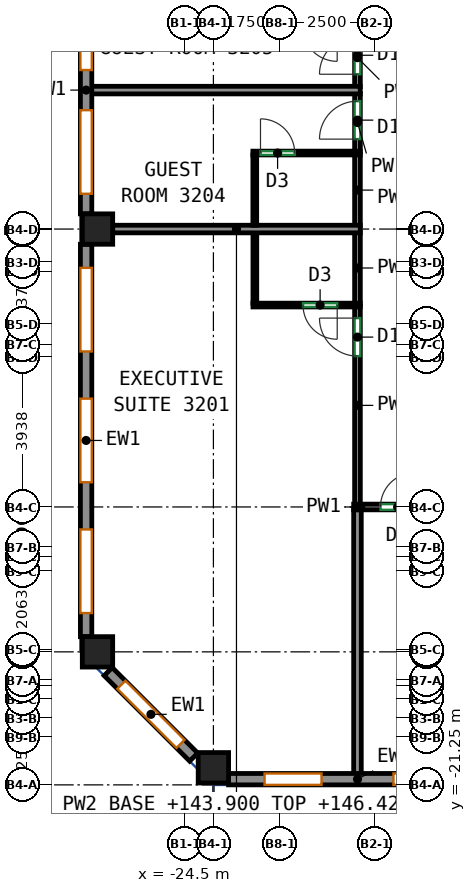
"""IFC4 building model, lengths in metres.
Left out: names, types, materials, properties, quantities, classifications, styles, units other than length and angle.
Written with IfcOpenShell. Run it as: python <this file> out.ifc"""

import sys

from ifc_helpers import new_model, si_unit, direction, frame, frame_2d, origin, origin_2d, place, context, subcontext, project, spatial, rectangle, extrude, source, transform, mapped, element, fill, save


model = new_model("IFC4")
c1 = context("Model", 3, precision=1e-05, world=origin(), true_north=direction((0.0, 1.0)))
c2 = subcontext(c1, "Body", "Model", "MODEL_VIEW")
j1 = project(units=[si_unit("LENGTHUNIT", "METRE"), si_unit("PLANEANGLEUNIT", "RADIAN")], contexts=[c1])
p1 = place(None, origin())
s1 = spatial("IfcSite", under=j1, at=p1, CompositionType="ELEMENT")
p2 = place(p1, origin())
s2 = spatial("IfcBuilding", under=s1, at=p2, CompositionType="ELEMENT")
p3 = place(p2, frame((0.0, 0.0, 143.9)))
s3 = spatial("IfcBuildingStorey", under=s2, at=p3, CompositionType="ELEMENT", Elevation=143.9)
m1 = source(origin(), c2, "Body", "SweptSolid", [
    extrude(rectangle(XDim=0.8, YDim=0.8, at=origin_2d()), origin(), (0.0, 0.0, 1.0), 3.12),
])
for number, where, z_axis, x_axis in (
    (1, (-26.8, -17.75, 0.0), (0.0, 0.0, 1.0), (1.0, 0.0, 0.0)),
    (2, (-26.8, -6.625, 0.0), (0.0, 0.0, 1.0), (1.0, 0.0, 0.0)),
    (3, (-23.75, -20.8, 0.0), (0.0, 0.0, 1.0), (1.0, 0.0, 0.0)),
):
    element("IfcColumn", number, at=place(p3, frame(where, z_axis=z_axis, x_axis=x_axis)), inside=s3, PredefinedType="COLUMN", context=c2, shape_type="MappedRepresentation", body=[
        mapped(m1, transform((0.0, 0.0, 0.0))),
    ])
m2 = source(origin(), c2, "Body", "SweptSolid", [
    extrude(rectangle(XDim=6.783, YDim=0.3, at=frame_2d((3.392, 0.0))), origin(), (0.0, 0.0, 1.0), 3.12),
])
p4 = place(p3, frame((-23.35, -21.1, 0.0), z_axis=(0.0, 0.0, 1.0), x_axis=(1.0, 0.0, 0.0)))
e4 = element("IfcWall", 4, at=p4, inside=s3, PredefinedType="SOLIDWALL", context=c2, shape_type="MappedRepresentation", body=[
    mapped(m2, transform((0.0, 0.0, 0.0))),
])
p5 = place(p4, frame((0.946, 0.0, 0.85)))
e5 = element("IfcOpeningElement", 5, at=p5, cuts=e4, PredefinedType="OPENING", context=c2, shape_type="SweptSolid", body=[
    extrude(rectangle(XDim=1.5, YDim=1.95, at=frame_2d((0.75, 0.975))), frame((0.0, 0.16, 0.0), z_axis=(0.0, -1.0, 0.0), x_axis=(1.0, 0.0, 0.0)), (0.0, 0.0, 1.0), 0.32),
])
p6 = place(p4, frame((4.337, 0.0, 0.85)))
e6 = element("IfcOpeningElement", 6, at=p6, cuts=e4, PredefinedType="OPENING", context=c2, shape_type="SweptSolid", body=[
    extrude(rectangle(XDim=1.5, YDim=1.95, at=frame_2d((0.75, 0.975))), frame((0.0, 0.16, 0.0), z_axis=(0.0, -1.0, 0.0), x_axis=(1.0, 0.0, 0.0)), (0.0, 0.0, 1.0), 0.32),
])
m3 = source(origin(), c2, "Body", "SweptSolid", [
    extrude(rectangle(XDim=6.513, YDim=0.3, at=frame_2d((3.256, 0.0))), origin(), (0.0, 0.0, 1.0), 3.12),
])
p7 = place(p3, frame((-27.1, 0.288, 0.0), z_axis=(0.0, 0.0, 1.0), x_axis=(0.0, -1.0, 0.0)))
e7 = element("IfcWall", 7, at=p7, inside=s3, PredefinedType="SOLIDWALL", context=c2, shape_type="MappedRepresentation", body=[
    mapped(m3, transform((0.0, 0.0, 0.0))),
])
p8 = place(p7, frame((0.528, 0.0, 0.85)))
e8 = element("IfcOpeningElement", 8, at=p8, cuts=e7, PredefinedType="OPENING", context=c2, shape_type="SweptSolid", body=[
    extrude(rectangle(XDim=2.2, YDim=1.95, at=frame_2d((1.1, 0.975))), frame((0.0, 0.16, 0.0), z_axis=(0.0, -1.0, 0.0), x_axis=(1.0, 0.0, 0.0)), (0.0, 0.0, 1.0), 0.32),
])
p9 = place(p7, frame((3.784, 0.0, 0.85)))
e9 = element("IfcOpeningElement", 9, at=p9, cuts=e7, PredefinedType="OPENING", context=c2, shape_type="SweptSolid", body=[
    extrude(rectangle(XDim=2.2, YDim=1.95, at=frame_2d((1.1, 0.975))), frame((0.0, 0.16, 0.0), z_axis=(0.0, -1.0, 0.0), x_axis=(1.0, 0.0, 0.0)), (0.0, 0.0, 1.0), 0.32),
])
m4 = source(origin(), c2, "Body", "SweptSolid", [
    extrude(rectangle(XDim=10.325, YDim=0.3, at=frame_2d((5.163, 0.0))), origin(), (0.0, 0.0, 1.0), 3.12),
])
p10 = place(p3, frame((-27.1, -7.025, 0.0), z_axis=(0.0, 0.0, 1.0), x_axis=(0.0, -1.0, 0.0)))
e10 = element("IfcWall", 10, at=p10, inside=s3, PredefinedType="SOLIDWALL", context=c2, shape_type="MappedRepresentation", body=[
    mapped(m4, transform((0.0, 0.0, 0.0))),
])
p11 = place(p10, frame((0.621, 0.0, 0.85)))
e11 = element("IfcOpeningElement", 11, at=p11, cuts=e10, PredefinedType="OPENING", context=c2, shape_type="SweptSolid", body=[
    extrude(rectangle(XDim=2.2, YDim=1.95, at=frame_2d((1.1, 0.975))), frame((0.0, 0.16, 0.0), z_axis=(0.0, -1.0, 0.0), x_axis=(1.0, 0.0, 0.0)), (0.0, 0.0, 1.0), 0.32),
])
p12 = place(p10, frame((4.062, 0.0, 0.85)))
e12 = element("IfcOpeningElement", 12, at=p12, cuts=e10, PredefinedType="OPENING", context=c2, shape_type="SweptSolid", body=[
    extrude(rectangle(XDim=2.2, YDim=1.95, at=frame_2d((1.1, 0.975))), frame((0.0, 0.16, 0.0), z_axis=(0.0, -1.0, 0.0), x_axis=(1.0, 0.0, 0.0)), (0.0, 0.0, 1.0), 0.32),
])
p13 = place(p10, frame((7.504, 0.0, 0.85)))
e13 = element("IfcOpeningElement", 13, at=p13, cuts=e10, PredefinedType="OPENING", context=c2, shape_type="SweptSolid", body=[
    extrude(rectangle(XDim=2.2, YDim=1.95, at=frame_2d((1.1, 0.975))), frame((0.0, 0.16, 0.0), z_axis=(0.0, -1.0, 0.0), x_axis=(1.0, 0.0, 0.0)), (0.0, 0.0, 1.0), 0.32),
])
m5 = source(origin(), c2, "Body", "SweptSolid", [
    extrude(rectangle(XDim=3.182, YDim=0.3, at=frame_2d((1.591, 0.0))), origin(), (0.0, 0.0, 1.0), 3.12),
])
p14 = place(p3, frame((-26.519, -18.269, 0.0), z_axis=(0.0, 0.0, 1.0), x_axis=(0.707068419229, -0.707145141063, 0.0)))
e14 = element("IfcWall", 14, at=p14, inside=s3, PredefinedType="SOLIDWALL", context=c2, shape_type="MappedRepresentation", body=[
    mapped(m5, transform((0.0, 0.0, 0.0))),
])
p15 = place(p14, frame((0.491, 0.0, 0.85)))
e15 = element("IfcOpeningElement", 15, at=p15, cuts=e14, PredefinedType="OPENING", context=c2, shape_type="SweptSolid", body=[
    extrude(rectangle(XDim=2.2, YDim=1.95, at=frame_2d((1.1, 0.975))), frame((0.0, 0.16, 0.0), z_axis=(0.0, -1.0, 0.0), x_axis=(1.0, 0.0, 0.0)), (0.0, 0.0, 1.0), 0.32),
])
p16 = place(p3, frame((-20.059, -13.938, 0.0), z_axis=(0.0, 0.0, 1.0), x_axis=(1.0, 0.0, 0.0)))
e16 = element("IfcWall", 16, at=p16, inside=s3, PredefinedType="PARTITIONING", context=c2, shape_type="SweptSolid", body=[
    extrude(rectangle(XDim=2.309, YDim=0.15, at=frame_2d((1.155, 0.0))), origin(), (0.0, 0.0, 1.0), 3.12),
])
p17 = place(p16, frame((0.705, 0.0, 0.0)))
e17 = element("IfcOpeningElement", 17, at=p17, cuts=e16, PredefinedType="OPENING", context=c2, shape_type="SweptSolid", body=[
    extrude(rectangle(XDim=0.9, YDim=2.1, at=frame_2d((0.45, 1.05))), frame((0.0, 0.085, 0.0), z_axis=(0.0, -1.0, 0.0), x_axis=(1.0, 0.0, 0.0)), (0.0, 0.0, 1.0), 0.17),
])
p18 = place(p3, frame((-19.959, -13.863, 0.0), z_axis=(0.0, 0.0, 1.0), x_axis=(0.0, 1.0, 0.0)))
e18 = element("IfcWall", 18, at=p18, inside=s3, PredefinedType="PARTITIONING", context=c2, shape_type="SweptSolid", body=[
    extrude(rectangle(XDim=5.198, YDim=0.15, at=frame_2d((2.599, 0.0))), origin(), (0.0, 0.0, 1.0), 3.12),
])
p19 = place(p18, frame((3.895, 0.0, 0.0)))
e19 = element("IfcOpeningElement", 19, at=p19, cuts=e18, PredefinedType="OPENING", context=c2, shape_type="SweptSolid", body=[
    extrude(rectangle(XDim=1.0, YDim=2.1, at=frame_2d((0.5, 1.05))), frame((0.0, 0.085, 0.0), z_axis=(0.0, -1.0, 0.0), x_axis=(1.0, 0.0, 0.0)), (0.0, 0.0, 1.0), 0.17),
])
p20 = place(p3, frame((-19.959, -8.585, 0.0), z_axis=(0.0, 0.0, 1.0), x_axis=(0.0, 1.0, 0.0)))
e20 = element("IfcWall", 20, at=p20, inside=s3, PredefinedType="PARTITIONING", context=c2, shape_type="SweptSolid", body=[
    extrude(rectangle(XDim=1.87, YDim=0.15, at=frame_2d((0.935, 0.0))), origin(), (0.0, 0.0, 1.0), 3.12),
])
p21 = place(p3, frame((-19.959, -4.585, 0.0), z_axis=(0.0, 0.0, 1.0), x_axis=(0.0, 1.0, 0.0)))
e21 = element("IfcWall", 21, at=p21, inside=s3, PredefinedType="PARTITIONING", context=c2, shape_type="SweptSolid", body=[
    extrude(rectangle(XDim=1.526, YDim=0.15, at=frame_2d((0.763, 0.0))), origin(), (0.0, 0.0, 1.0), 3.12),
])
p22 = place(p21, frame((0.326, 0.0, 0.0)))
e22 = element("IfcOpeningElement", 22, at=p22, cuts=e21, PredefinedType="OPENING", context=c2, shape_type="SweptSolid", body=[
    extrude(rectangle(XDim=1.0, YDim=2.1, at=frame_2d((0.5, 1.05))), frame((0.0, 0.085, 0.0), z_axis=(0.0, -1.0, 0.0), x_axis=(1.0, 0.0, 0.0)), (0.0, 0.0, 1.0), 0.17),
])
p23 = place(p3, frame((-19.959, -6.535, 0.0), z_axis=(0.0, 0.0, 1.0), x_axis=(0.0, 1.0, 0.0)))
e23 = element("IfcWall", 23, at=p23, inside=s3, PredefinedType="PARTITIONING", context=c2, shape_type="SweptSolid", body=[
    extrude(rectangle(XDim=1.87, YDim=0.15, at=frame_2d((0.935, 0.0))), origin(), (0.0, 0.0, 1.0), 3.12),
])
p24 = place(p3, frame((-19.959, -2.879, 0.0), z_axis=(0.0, 0.0, 1.0), x_axis=(0.0, 1.0, 0.0)))
e24 = element("IfcWall", 24, at=p24, inside=s3, PredefinedType="PARTITIONING", context=c2, shape_type="SweptSolid", body=[
    extrude(rectangle(XDim=1.527, YDim=0.15, at=frame_2d((0.763, 0.0))), origin(), (0.0, 0.0, 1.0), 3.12),
])
p25 = place(p24, frame((0.327, 0.0, 0.0)))
e25 = element("IfcOpeningElement", 25, at=p25, cuts=e24, PredefinedType="OPENING", context=c2, shape_type="SweptSolid", body=[
    extrude(rectangle(XDim=1.0, YDim=2.1, at=frame_2d((0.5, 1.05))), frame((0.0, 0.085, 0.0), z_axis=(0.0, -1.0, 0.0), x_axis=(1.0, 0.0, 0.0)), (0.0, 0.0, 1.0), 0.17),
])
p26 = place(p3, frame((-19.959, -21.0, 0.0), z_axis=(0.0, 0.0, 1.0), x_axis=(0.0, 1.0, 0.0)))
e26 = element("IfcWall", 26, at=p26, inside=s3, PredefinedType="PARTITIONING", context=c2, shape_type="SweptSolid", body=[
    extrude(rectangle(XDim=6.985, YDim=0.2, at=frame_2d((3.493, 0.0))), origin(), (0.0, 0.0, 1.0), 3.12),
])
p27 = place(p3, frame((-22.659, -8.575, 0.0), z_axis=(0.0, 0.0, 1.0), x_axis=(0.0, 1.0, 0.0)))
e27 = element("IfcWall", 27, at=p27, inside=s3, PredefinedType="PARTITIONING", context=c2, shape_type="SweptSolid", body=[
    extrude(rectangle(XDim=1.85, YDim=0.1, at=frame_2d((0.925, 0.0))), origin(), (0.0, 0.0, 1.0), 3.12),
])
p28 = place(p3, frame((-19.886, -8.625, 0.0), z_axis=(0.0, 0.0, 1.0), x_axis=(-1.0, 0.0, 0.0)))
e28 = element("IfcWall", 28, at=p28, inside=s3, PredefinedType="PARTITIONING", context=c2, shape_type="SweptSolid", body=[
    extrude(rectangle(XDim=2.823, YDim=0.1, at=frame_2d((1.412, 0.0))), origin(), (0.0, 0.0, 1.0), 3.12),
])
p29 = place(p28, frame((0.606, 0.0, 0.0)))
e29 = element("IfcOpeningElement", 29, at=p29, cuts=e28, PredefinedType="OPENING", context=c2, shape_type="SweptSolid", body=[
    extrude(rectangle(XDim=0.9, YDim=2.1, at=frame_2d((0.45, 1.05))), frame((0.0, 0.06, 0.0), z_axis=(0.0, -1.0, 0.0), x_axis=(1.0, 0.0, 0.0)), (0.0, 0.0, 1.0), 0.12),
])
p30 = place(p3, frame((-26.4, -6.625, 0.0), z_axis=(0.0, 0.0, 1.0), x_axis=(1.0, 0.0, 0.0)))
e30 = element("IfcWall", 30, at=p30, inside=s3, PredefinedType="PARTITIONING", context=c2, shape_type="SweptSolid", body=[
    extrude(rectangle(XDim=6.514, YDim=0.2, at=frame_2d((3.257, 0.0))), origin(), (0.0, 0.0, 1.0), 2.52),
])
p31 = place(p3, frame((-22.711, -4.625, 0.0), z_axis=(0.0, 0.0, 1.0), x_axis=(1.0, 0.0, 0.0)))
e31 = element("IfcWall", 31, at=p31, inside=s3, PredefinedType="PARTITIONING", context=c2, shape_type="SweptSolid", body=[
    extrude(rectangle(XDim=2.825, YDim=0.1, at=frame_2d((1.413, 0.0))), origin(), (0.0, 0.0, 1.0), 3.12),
])
p32 = place(p31, frame((0.2, 0.0, 0.0)))
e32 = element("IfcOpeningElement", 32, at=p32, cuts=e31, PredefinedType="OPENING", context=c2, shape_type="SweptSolid", body=[
    extrude(rectangle(XDim=0.9, YDim=2.1, at=frame_2d((0.45, 1.05))), frame((0.0, 0.06, 0.0), z_axis=(0.0, -1.0, 0.0), x_axis=(1.0, 0.0, 0.0)), (0.0, 0.0, 1.0), 0.12),
])
p33 = place(p3, frame((-22.661, -6.525, 0.0), z_axis=(0.0, 0.0, 1.0), x_axis=(0.0, 1.0, 0.0)))
e33 = element("IfcWall", 33, at=p33, inside=s3, PredefinedType="PARTITIONING", context=c2, shape_type="SweptSolid", body=[
    extrude(rectangle(XDim=1.85, YDim=0.1, at=frame_2d((0.925, 0.0))), origin(), (0.0, 0.0, 1.0), 3.12),
])
p34 = place(p3, frame((-19.886, -2.969, 0.0), z_axis=(0.0, 0.0, 1.0), x_axis=(-1.0, 0.0, 0.0)))
e34 = element("IfcWall", 34, at=p34, inside=s3, PredefinedType="PARTITIONING", context=c2, shape_type="SweptSolid", body=[
    extrude(rectangle(XDim=7.114, YDim=0.2, at=frame_2d((3.557, 0.0))), origin(), (0.0, 0.0, 1.0), 3.12),
])
p35 = place(p5, origin())
e35 = element("IfcWindow", 35, at=p35, inside=s3, PartitioningType="SINGLE_PANEL", PredefinedType="WINDOW", context=c2, shape_type="SweptSolid", body=[
    extrude(rectangle(XDim=1.5, YDim=1.95, at=frame_2d((0.75, 0.975))), frame((0.0, 0.03, 0.0), z_axis=(0.0, -1.0, 0.0), x_axis=(1.0, 0.0, 0.0)), (0.0, 0.0, 1.0), 0.06),
])
fill(e5, e35)
p36 = place(p6, origin())
e36 = element("IfcWindow", 36, at=p36, inside=s3, PartitioningType="SINGLE_PANEL", PredefinedType="WINDOW", context=c2, shape_type="SweptSolid", body=[
    extrude(rectangle(XDim=1.5, YDim=1.95, at=frame_2d((0.75, 0.975))), frame((0.0, 0.03, 0.0), z_axis=(0.0, -1.0, 0.0), x_axis=(1.0, 0.0, 0.0)), (0.0, 0.0, 1.0), 0.06),
])
fill(e6, e36)
p37 = place(p8, origin())
e37 = element("IfcWindow", 37, at=p37, inside=s3, PartitioningType="SINGLE_PANEL", PredefinedType="WINDOW", context=c2, shape_type="SweptSolid", body=[
    extrude(rectangle(XDim=2.2, YDim=1.95, at=frame_2d((1.1, 0.975))), frame((0.0, 0.03, 0.0), z_axis=(0.0, -1.0, 0.0), x_axis=(1.0, 0.0, 0.0)), (0.0, 0.0, 1.0), 0.06),
])
fill(e8, e37)
p38 = place(p9, origin())
e38 = element("IfcWindow", 38, at=p38, inside=s3, PartitioningType="SINGLE_PANEL", PredefinedType="WINDOW", context=c2, shape_type="SweptSolid", body=[
    extrude(rectangle(XDim=2.2, YDim=1.95, at=frame_2d((1.1, 0.975))), frame((0.0, 0.03, 0.0), z_axis=(0.0, -1.0, 0.0), x_axis=(1.0, 0.0, 0.0)), (0.0, 0.0, 1.0), 0.06),
])
fill(e9, e38)
p39 = place(p11, origin())
e39 = element("IfcWindow", 39, at=p39, inside=s3, PartitioningType="SINGLE_PANEL", PredefinedType="WINDOW", context=c2, shape_type="SweptSolid", body=[
    extrude(rectangle(XDim=2.2, YDim=1.95, at=frame_2d((1.1, 0.975))), frame((0.0, 0.03, 0.0), z_axis=(0.0, -1.0, 0.0), x_axis=(1.0, 0.0, 0.0)), (0.0, 0.0, 1.0), 0.06),
])
fill(e11, e39)
p40 = place(p12, origin())
e40 = element("IfcWindow", 40, at=p40, inside=s3, PartitioningType="SINGLE_PANEL", PredefinedType="WINDOW", context=c2, shape_type="SweptSolid", body=[
    extrude(rectangle(XDim=2.2, YDim=1.95, at=frame_2d((1.1, 0.975))), frame((0.0, 0.03, 0.0), z_axis=(0.0, -1.0, 0.0), x_axis=(1.0, 0.0, 0.0)), (0.0, 0.0, 1.0), 0.06),
])
fill(e12, e40)
p41 = place(p13, origin())
e41 = element("IfcWindow", 41, at=p41, inside=s3, PartitioningType="SINGLE_PANEL", PredefinedType="WINDOW", context=c2, shape_type="SweptSolid", body=[
    extrude(rectangle(XDim=2.2, YDim=1.95, at=frame_2d((1.1, 0.975))), frame((0.0, 0.03, 0.0), z_axis=(0.0, -1.0, 0.0), x_axis=(1.0, 0.0, 0.0)), (0.0, 0.0, 1.0), 0.06),
])
fill(e13, e41)
p42 = place(p15, origin())
e42 = element("IfcWindow", 42, at=p42, inside=s3, PartitioningType="SINGLE_PANEL", PredefinedType="WINDOW", context=c2, shape_type="SweptSolid", body=[
    extrude(rectangle(XDim=2.2, YDim=1.95, at=frame_2d((1.1, 0.975))), frame((0.0, 0.03, 0.0), z_axis=(0.0, -1.0, 0.0), x_axis=(1.0, 0.0, 0.0)), (0.0, 0.0, 1.0), 0.06),
])
fill(e15, e42)
p43 = place(p17, origin())
e43 = element("IfcDoor", 43, at=p43, inside=s3, OperationType="SINGLE_SWING_RIGHT", PredefinedType="DOOR", context=c2, shape_type="SweptSolid", body=[
    extrude(rectangle(XDim=0.9, YDim=2.1, at=frame_2d((0.45, 1.05))), frame((0.0, 0.025, 0.0), z_axis=(0.0, -1.0, 0.0), x_axis=(1.0, 0.0, 0.0)), (0.0, 0.0, 1.0), 0.05),
])
fill(e17, e43)
p44 = place(p19, origin())
e44 = element("IfcDoor", 44, at=p44, inside=s3, OperationType="SINGLE_SWING_RIGHT", PredefinedType="DOOR", context=c2, shape_type="SweptSolid", body=[
    extrude(rectangle(XDim=1.0, YDim=2.1, at=frame_2d((0.5, 1.05))), frame((0.0, 0.025, 0.0), z_axis=(0.0, -1.0, 0.0), x_axis=(1.0, 0.0, 0.0)), (0.0, 0.0, 1.0), 0.05),
])
fill(e19, e44)
p45 = place(p29, origin())
e45 = element("IfcDoor", 45, at=p45, inside=s3, OperationType="SINGLE_SWING_LEFT", PredefinedType="DOOR", context=c2, shape_type="SweptSolid", body=[
    extrude(rectangle(XDim=0.9, YDim=2.1, at=frame_2d((0.45, 1.05))), frame((0.0, 0.025, 0.0), z_axis=(0.0, -1.0, 0.0), x_axis=(1.0, 0.0, 0.0)), (0.0, 0.0, 1.0), 0.05),
])
fill(e29, e45)
p46 = place(p32, origin())
e46 = element("IfcDoor", 46, at=p46, inside=s3, OperationType="SINGLE_SWING_LEFT", PredefinedType="DOOR", context=c2, shape_type="SweptSolid", body=[
    extrude(rectangle(XDim=0.9, YDim=2.1, at=frame_2d((0.45, 1.05))), frame((0.0, 0.025, 0.0), z_axis=(0.0, -1.0, 0.0), x_axis=(1.0, 0.0, 0.0)), (0.0, 0.0, 1.0), 0.05),
])
fill(e32, e46)
p47 = place(p22, origin())
e47 = element("IfcDoor", 47, at=p47, inside=s3, OperationType="SINGLE_SWING_LEFT", PredefinedType="DOOR", context=c2, shape_type="SweptSolid", body=[
    extrude(rectangle(XDim=1.0, YDim=2.1, at=frame_2d((0.5, 1.05))), frame((0.0, 0.025, 0.0), z_axis=(0.0, -1.0, 0.0), x_axis=(1.0, 0.0, 0.0)), (0.0, 0.0, 1.0), 0.05),
])
fill(e22, e47)
p48 = place(p25, origin())
e48 = element("IfcDoor", 48, at=p48, inside=s3, OperationType="SINGLE_SWING_LEFT", PredefinedType="DOOR", context=c2, shape_type="SweptSolid", body=[
    extrude(rectangle(XDim=1.0, YDim=2.1, at=frame_2d((0.5, 1.05))), frame((0.0, 0.025, 0.0), z_axis=(0.0, -1.0, 0.0), x_axis=(1.0, 0.0, 0.0)), (0.0, 0.0, 1.0), 0.05),
])
fill(e25, e48)
save(model, sys.argv[1])
